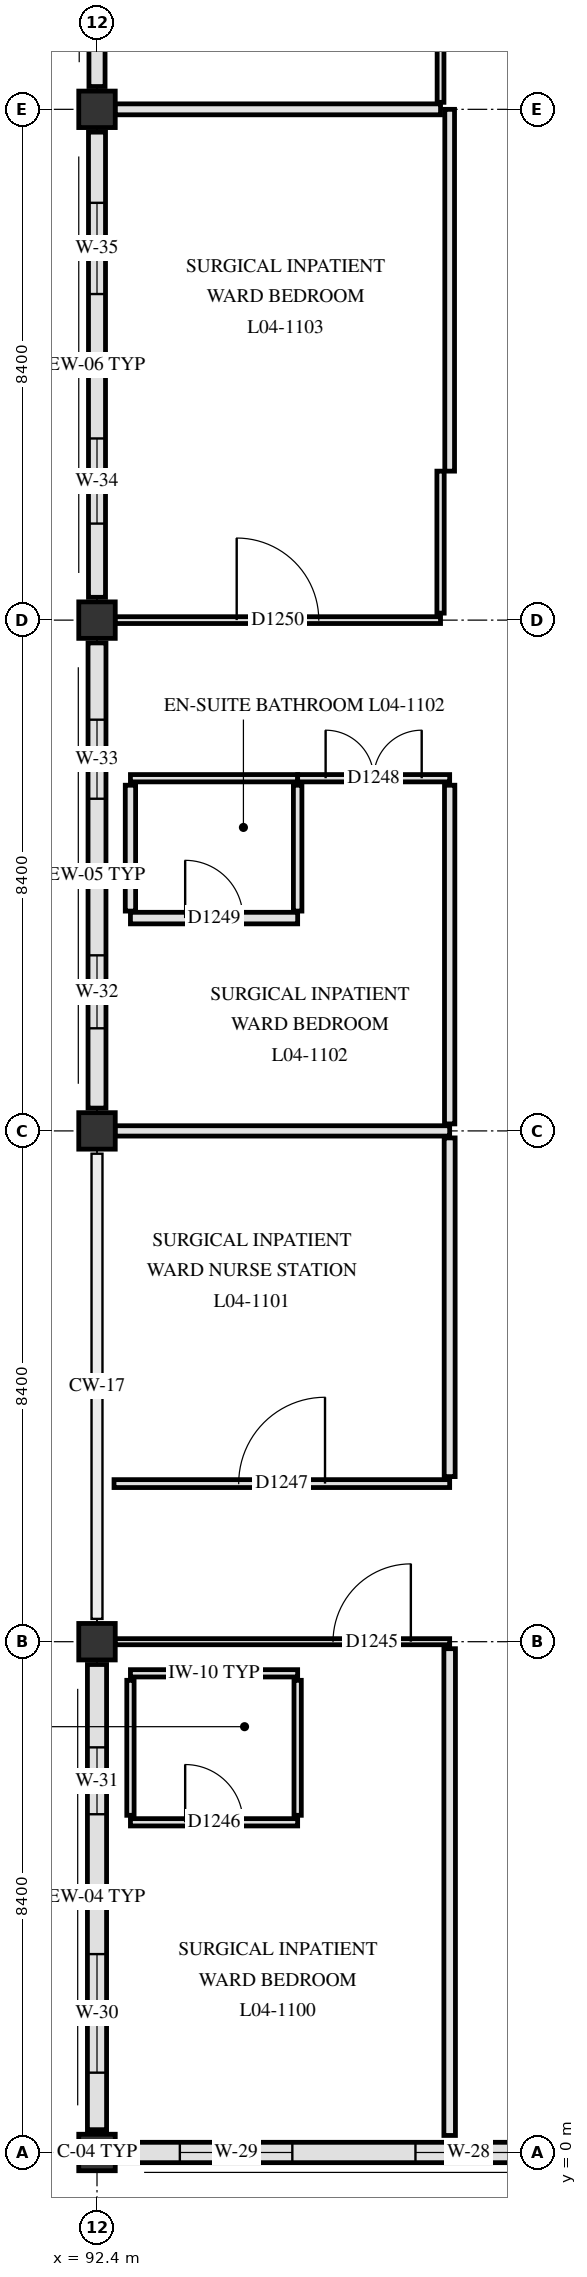
"""IFC4 building model, lengths in metres.
Left out: names, types, materials, properties, quantities, classifications, styles, units other than length and angle.
Written with IfcOpenShell. Run it as: python <this file> out.ifc"""

import sys

from ifc_helpers import new_model, si_unit, direction, frame, frame_2d, origin, origin_2d, place, context, subcontext, project, spatial, rectangle, extrude, element, fill, save


model = new_model("IFC4")
c1 = context("Model", 3, precision=1e-05, world=origin(), true_north=direction((0.0, 1.0)))
c2 = subcontext(c1, "Body", "Model", "MODEL_VIEW")
j1 = project(units=[si_unit("LENGTHUNIT", "METRE"), si_unit("PLANEANGLEUNIT", "RADIAN")], contexts=[c1])
p1 = place(None, origin())
s1 = spatial("IfcSite", under=j1, at=p1, CompositionType="ELEMENT")
p2 = place(p1, origin())
s2 = spatial("IfcBuilding", under=s1, at=p2, CompositionType="ELEMENT")
p3 = place(p2, frame((0.0, 0.0, 18.6)))
s3 = spatial("IfcBuildingStorey", under=s2, at=p3, CompositionType="ELEMENT", Elevation=18.6)
for number, where, z_axis, x_axis in (
    (1, (92.4, 0.0, 0.0), (0.0, 0.0, 1.0), (1.0, 0.0, 0.0)),
    (2, (92.4, 8.4, 0.0), (0.0, 0.0, 1.0), (1.0, 0.0, 0.0)),
    (3, (92.4, 16.8, 0.0), (0.0, 0.0, 1.0), (1.0, 0.0, 0.0)),
    (4, (92.4, 25.2, 0.0), (0.0, 0.0, 1.0), (1.0, 0.0, 0.0)),
    (5, (92.4, 33.6, 0.0), (0.0, 0.0, 1.0), (1.0, 0.0, 0.0)),
):
    element("IfcColumn", number, at=place(p3, frame(where, z_axis=z_axis, x_axis=x_axis)), inside=s3, PredefinedType="COLUMN", context=c2, shape_type="SweptSolid", body=[
        extrude(rectangle(XDim=0.6, YDim=0.6, at=origin_2d()), origin(), (0.0, 0.0, 1.0), 3.9),
    ])
p4 = place(p3, frame((100.425, 0.0, 0.0), z_axis=(0.0, 0.0, 1.0), x_axis=(-1.0, 0.0, 0.0)))
e6 = element("IfcWall", 6, at=p4, inside=s3, PredefinedType="SOLIDWALL", context=c2, shape_type="SweptSolid", body=[
    extrude(rectangle(XDim=7.65, YDim=0.335, at=frame_2d((3.825, 0.0))), origin(), (0.0, 0.0, 1.0), 3.31),
])
p5 = place(p4, frame((1.038, 0.0, 0.85)))
e7 = element("IfcOpeningElement", 7, at=p5, cuts=e6, PredefinedType="OPENING", context=c2, shape_type="SweptSolid", body=[
    extrude(rectangle(XDim=1.75, YDim=1.54, at=frame_2d((0.875, 0.77))), frame((0.0, 0.177, 0.0), z_axis=(0.0, -1.0, 0.0), x_axis=(1.0, 0.0, 0.0)), (0.0, 0.0, 1.0), 0.355),
])
p6 = place(p4, frame((4.812, 0.0, 0.85)))
e8 = element("IfcOpeningElement", 8, at=p6, cuts=e6, PredefinedType="OPENING", context=c2, shape_type="SweptSolid", body=[
    extrude(rectangle(XDim=1.85, YDim=1.54, at=frame_2d((0.925, 0.77))), frame((0.0, 0.177, 0.0), z_axis=(0.0, -1.0, 0.0), x_axis=(1.0, 0.0, 0.0)), (0.0, 0.0, 1.0), 0.355),
])
p7 = place(p3, frame((92.4, 0.375, 0.0), z_axis=(0.0, 0.0, 1.0), x_axis=(0.0, 1.0, 0.0)))
e9 = element("IfcWall", 9, at=p7, inside=s3, PredefinedType="SOLIDWALL", context=c2, shape_type="SweptSolid", body=[
    extrude(rectangle(XDim=7.65, YDim=0.315, at=frame_2d((3.825, 0.0))), origin(), (0.0, 0.0, 1.0), 3.31),
])
p8 = place(p7, frame((0.938, 0.0, 0.85)))
e10 = element("IfcOpeningElement", 10, at=p8, cuts=e9, PredefinedType="OPENING", context=c2, shape_type="SweptSolid", body=[
    extrude(rectangle(XDim=1.95, YDim=1.54, at=frame_2d((0.975, 0.77))), frame((0.0, 0.167, 0.0), z_axis=(0.0, -1.0, 0.0), x_axis=(1.0, 0.0, 0.0)), (0.0, 0.0, 1.0), 0.335),
])
p9 = place(p7, frame((5.188, 0.0, 0.85)))
e11 = element("IfcOpeningElement", 11, at=p9, cuts=e9, PredefinedType="OPENING", context=c2, shape_type="SweptSolid", body=[
    extrude(rectangle(XDim=1.1, YDim=1.66, at=frame_2d((0.55, 0.83))), frame((0.0, 0.167, 0.0), z_axis=(0.0, -1.0, 0.0), x_axis=(1.0, 0.0, 0.0)), (0.0, 0.0, 1.0), 0.335),
])
p10 = place(p3, frame((92.4, 17.175, 0.0), z_axis=(0.0, 0.0, 1.0), x_axis=(0.0, 1.0, 0.0)))
e12 = element("IfcWall", 12, at=p10, inside=s3, PredefinedType="SOLIDWALL", context=c2, shape_type="SweptSolid", body=[
    extrude(rectangle(XDim=7.65, YDim=0.295, at=frame_2d((3.825, 0.0))), origin(), (0.0, 0.0, 1.0), 3.31),
])
p11 = place(p10, frame((1.312, 0.0, 0.85)))
e13 = element("IfcOpeningElement", 13, at=p11, cuts=e12, PredefinedType="OPENING", context=c2, shape_type="SweptSolid", body=[
    extrude(rectangle(XDim=1.2, YDim=1.66, at=frame_2d((0.6, 0.83))), frame((0.0, 0.157, 0.0), z_axis=(0.0, -1.0, 0.0), x_axis=(1.0, 0.0, 0.0)), (0.0, 0.0, 1.0), 0.315),
])
p12 = place(p10, frame((5.087, 0.0, 0.85)))
e14 = element("IfcOpeningElement", 14, at=p12, cuts=e12, PredefinedType="OPENING", context=c2, shape_type="SweptSolid", body=[
    extrude(rectangle(XDim=1.3, YDim=1.66, at=frame_2d((0.65, 0.83))), frame((0.0, 0.157, 0.0), z_axis=(0.0, -1.0, 0.0), x_axis=(1.0, 0.0, 0.0)), (0.0, 0.0, 1.0), 0.315),
])
p13 = place(p3, frame((92.4, 25.575, 0.0), z_axis=(0.0, 0.0, 1.0), x_axis=(0.0, 1.0, 0.0)))
e15 = element("IfcWall", 15, at=p13, inside=s3, PredefinedType="SOLIDWALL", context=c2, shape_type="SweptSolid", body=[
    extrude(rectangle(XDim=7.65, YDim=0.28, at=frame_2d((3.825, 0.0))), origin(), (0.0, 0.0, 1.0), 3.31),
])
p14 = place(p13, frame((1.212, 0.0, 0.85)))
e16 = element("IfcOpeningElement", 16, at=p14, cuts=e15, PredefinedType="OPENING", context=c2, shape_type="SweptSolid", body=[
    extrude(rectangle(XDim=1.4, YDim=1.66, at=frame_2d((0.7, 0.83))), frame((0.0, 0.15, 0.0), z_axis=(0.0, -1.0, 0.0), x_axis=(1.0, 0.0, 0.0)), (0.0, 0.0, 1.0), 0.3),
])
p15 = place(p13, frame((4.988, 0.0, 0.85)))
e17 = element("IfcOpeningElement", 17, at=p15, cuts=e15, PredefinedType="OPENING", context=c2, shape_type="SweptSolid", body=[
    extrude(rectangle(XDim=1.5, YDim=1.66, at=frame_2d((0.75, 0.83))), frame((0.0, 0.15, 0.0), z_axis=(0.0, -1.0, 0.0), x_axis=(1.0, 0.0, 0.0)), (0.0, 0.0, 1.0), 0.3),
])
p16 = place(p3, frame((92.4, 33.975, 0.0), z_axis=(0.0, 0.0, 1.0), x_axis=(0.0, 1.0, 0.0)))
e18 = element("IfcWall", 18, at=p16, inside=s3, PredefinedType="SOLIDWALL", context=c2, shape_type="SweptSolid", body=[
    extrude(rectangle(XDim=7.65, YDim=0.265, at=frame_2d((3.825, 0.0))), origin(), (0.0, 0.0, 1.0), 3.38),
])
p17 = place(p16, frame((1.113, 0.0, 0.85)))
e19 = element("IfcOpeningElement", 19, at=p17, cuts=e18, PredefinedType="OPENING", context=c2, shape_type="SweptSolid", body=[
    extrude(rectangle(XDim=1.6, YDim=1.66, at=frame_2d((0.8, 0.83))), frame((0.0, 0.142, 0.0), z_axis=(0.0, -1.0, 0.0), x_axis=(1.0, 0.0, 0.0)), (0.0, 0.0, 1.0), 0.285),
])
p18 = place(p16, frame((4.887, 0.0, 0.85)))
e20 = element("IfcOpeningElement", 20, at=p18, cuts=e18, PredefinedType="OPENING", context=c2, shape_type="SweptSolid", body=[
    extrude(rectangle(XDim=1.7, YDim=1.66, at=frame_2d((0.85, 0.83))), frame((0.0, 0.142, 0.0), z_axis=(0.0, -1.0, 0.0), x_axis=(1.0, 0.0, 0.0)), (0.0, 0.0, 1.0), 0.285),
])
p19 = place(p3, frame((92.95, 5.43, 0.0), z_axis=(0.0, 0.0, 1.0), x_axis=(1.0, 0.0, 0.0)))
e21 = element("IfcWall", 21, at=p19, inside=s3, PredefinedType="PARTITIONING", context=c2, shape_type="SweptSolid", body=[
    extrude(rectangle(XDim=2.75, YDim=0.12, at=frame_2d((1.375, 0.0))), origin(), (0.0, 0.0, 1.0), 3.61),
])
p20 = place(p19, frame((0.9, 0.0, 0.0)))
e22 = element("IfcOpeningElement", 22, at=p20, cuts=e21, PredefinedType="OPENING", context=c2, shape_type="SweptSolid", body=[
    extrude(rectangle(XDim=0.95, YDim=2.1, at=frame_2d((0.475, 1.05))), frame((0.0, 0.07, 0.0), z_axis=(0.0, -1.0, 0.0), x_axis=(1.0, 0.0, 0.0)), (0.0, 0.0, 1.0), 0.14),
])
p21 = place(p3, frame((92.95, 7.88, 0.0), z_axis=(0.0, 0.0, 1.0), x_axis=(1.0, 0.0, 0.0)))
e23 = element("IfcWall", 23, at=p21, inside=s3, PredefinedType="PARTITIONING", context=c2, shape_type="SweptSolid", body=[
    extrude(rectangle(XDim=2.75, YDim=0.12, at=frame_2d((1.375, 0.0))), origin(), (0.0, 0.0, 1.0), 3.61),
])
p22 = place(p3, frame((92.695, 8.4, 0.0), z_axis=(0.0, 0.0, 1.0), x_axis=(1.0, 0.0, 0.0)))
e24 = element("IfcWall", 24, at=p22, inside=s3, PredefinedType="PARTITIONING", context=c2, shape_type="SweptSolid", body=[
    extrude(rectangle(XDim=5.505, YDim=0.1, at=frame_2d((2.752, 0.0))), origin(), (0.0, 0.0, 1.0), 3.16),
])
p23 = place(p22, frame((3.587, 0.0, 0.0)))
e25 = element("IfcOpeningElement", 25, at=p23, cuts=e24, PredefinedType="OPENING", context=c2, shape_type="SweptSolid", body=[
    extrude(rectangle(XDim=1.28, YDim=2.18, at=frame_2d((0.64, 1.09))), frame((0.0, 0.06, 0.0), z_axis=(0.0, -1.0, 0.0), x_axis=(1.0, 0.0, 0.0)), (0.0, 0.0, 1.0), 0.12),
])
p24 = place(p3, frame((92.68, 11.0, 0.0), z_axis=(0.0, 0.0, 1.0), x_axis=(1.0, 0.0, 0.0)))
e26 = element("IfcWall", 26, at=p24, inside=s3, PredefinedType="PARTITIONING", context=c2, shape_type="SweptSolid", body=[
    extrude(rectangle(XDim=5.52, YDim=0.13, at=frame_2d((2.76, 0.0))), origin(), (0.0, 0.0, 1.0), 3.61),
])
p25 = place(p24, frame((2.05, 0.0, 0.0)))
e27 = element("IfcOpeningElement", 27, at=p25, cuts=e26, PredefinedType="OPENING", context=c2, shape_type="SweptSolid", body=[
    extrude(rectangle(XDim=1.42, YDim=2.22, at=frame_2d((0.71, 1.11))), frame((0.0, 0.075, 0.0), z_axis=(0.0, -1.0, 0.0), x_axis=(1.0, 0.0, 0.0)), (0.0, 0.0, 1.0), 0.15),
])
p26 = place(p3, frame((92.695, 16.8, 0.0), z_axis=(0.0, 0.0, 1.0), x_axis=(1.0, 0.0, 0.0)))
e28 = element("IfcWall", 28, at=p26, inside=s3, PredefinedType="PARTITIONING", context=c2, shape_type="SweptSolid", body=[
    extrude(rectangle(XDim=5.505, YDim=0.17, at=frame_2d((2.752, 0.0))), origin(), (0.0, 0.0, 1.0), 3.16),
])
p27 = place(p3, frame((92.95, 20.3, 0.0), z_axis=(0.0, 0.0, 1.0), x_axis=(1.0, 0.0, 0.0)))
e29 = element("IfcWall", 29, at=p27, inside=s3, PredefinedType="PARTITIONING", context=c2, shape_type="SweptSolid", body=[
    extrude(rectangle(XDim=2.75, YDim=0.19, at=frame_2d((1.375, 0.0))), origin(), (0.0, 0.0, 1.0), 3.61),
])
p28 = place(p27, frame((0.9, 0.0, 0.0)))
e30 = element("IfcOpeningElement", 30, at=p28, cuts=e29, PredefinedType="OPENING", context=c2, shape_type="SweptSolid", body=[
    extrude(rectangle(XDim=0.95, YDim=2.1, at=frame_2d((0.475, 1.05))), frame((0.0, 0.105, 0.0), z_axis=(0.0, -1.0, 0.0), x_axis=(1.0, 0.0, 0.0)), (0.0, 0.0, 1.0), 0.21),
])
p29 = place(p3, frame((92.95, 22.6, 0.0), z_axis=(0.0, 0.0, 1.0), x_axis=(1.0, 0.0, 0.0)))
e31 = element("IfcWall", 31, at=p29, inside=s3, PredefinedType="PARTITIONING", context=c2, shape_type="SweptSolid", body=[
    extrude(rectangle(XDim=2.75, YDim=0.12, at=frame_2d((1.375, 0.0))), origin(), (0.0, 0.0, 1.0), 3.61),
])
p30 = place(p3, frame((95.7, 22.6, 0.0), z_axis=(0.0, 0.0, 1.0), x_axis=(1.0, 0.0, 0.0)))
e32 = element("IfcWall", 32, at=p30, inside=s3, PredefinedType="PARTITIONING", context=c2, shape_type="SweptSolid", body=[
    extrude(rectangle(XDim=2.5, YDim=0.12, at=frame_2d((1.25, 0.0))), origin(), (0.0, 0.0, 1.0), 3.61),
])
p31 = place(p30, frame((0.46, 0.0, 0.0)))
e33 = element("IfcOpeningElement", 33, at=p31, cuts=e32, PredefinedType="OPENING", context=c2, shape_type="SweptSolid", body=[
    extrude(rectangle(XDim=1.58, YDim=2.22, at=frame_2d((0.79, 1.11))), frame((0.0, 0.07, 0.0), z_axis=(0.0, -1.0, 0.0), x_axis=(1.0, 0.0, 0.0)), (0.0, 0.0, 1.0), 0.14),
])
p32 = place(p3, frame((92.695, 25.2, 0.0), z_axis=(0.0, 0.0, 1.0), x_axis=(1.0, 0.0, 0.0)))
e34 = element("IfcWall", 34, at=p32, inside=s3, PredefinedType="PARTITIONING", context=c2, shape_type="SweptSolid", body=[
    extrude(rectangle(XDim=5.355, YDim=0.112, at=frame_2d((2.677, 0.0))), origin(), (0.0, 0.0, 1.0), 3.16),
])
p33 = place(p32, frame((2.002, 0.0, 0.0)))
e35 = element("IfcOpeningElement", 35, at=p33, cuts=e34, PredefinedType="OPENING", context=c2, shape_type="SweptSolid", body=[
    extrude(rectangle(XDim=1.35, YDim=2.2, at=frame_2d((0.675, 1.1))), frame((0.0, 0.066, 0.0), z_axis=(0.0, -1.0, 0.0), x_axis=(1.0, 0.0, 0.0)), (0.0, 0.0, 1.0), 0.132),
])
p34 = place(p3, frame((92.695, 33.6, 0.0), z_axis=(0.0, 0.0, 1.0), x_axis=(1.0, 0.0, 0.0)))
e36 = element("IfcWall", 36, at=p34, inside=s3, PredefinedType="PARTITIONING", context=c2, shape_type="SweptSolid", body=[
    extrude(rectangle(XDim=5.355, YDim=0.18, at=frame_2d((2.677, 0.0))), origin(), (0.0, 0.0, 1.0), 3.16),
])
p35 = place(p3, frame((92.95, 5.545, 0.0), z_axis=(0.0, 0.0, 1.0), x_axis=(0.0, 1.0, 0.0)))
e37 = element("IfcWall", 37, at=p35, inside=s3, PredefinedType="PARTITIONING", context=c2, shape_type="SweptSolid", body=[
    extrude(rectangle(XDim=2.22, YDim=0.12, at=frame_2d((1.11, 0.0))), origin(), (0.0, 0.0, 1.0), 3.31),
])
p36 = place(p3, frame((92.95, 20.415, 0.0), z_axis=(0.0, 0.0, 1.0), x_axis=(0.0, 1.0, 0.0)))
e38 = element("IfcWall", 38, at=p36, inside=s3, PredefinedType="PARTITIONING", context=c2, shape_type="SweptSolid", body=[
    extrude(rectangle(XDim=2.07, YDim=0.17, at=frame_2d((1.035, 0.0))), origin(), (0.0, 0.0, 1.0), 3.31),
])
p37 = place(p3, frame((95.7, 5.545, 0.0), z_axis=(0.0, 0.0, 1.0), x_axis=(0.0, 1.0, 0.0)))
e39 = element("IfcWall", 39, at=p37, inside=s3, PredefinedType="PARTITIONING", context=c2, shape_type="SweptSolid", body=[
    extrude(rectangle(XDim=2.22, YDim=0.12, at=frame_2d((1.11, 0.0))), origin(), (0.0, 0.0, 1.0), 3.31),
])
p38 = place(p3, frame((95.7, 20.415, 0.0), z_axis=(0.0, 0.0, 1.0), x_axis=(0.0, 1.0, 0.0)))
e40 = element("IfcWall", 40, at=p38, inside=s3, PredefinedType="PARTITIONING", context=c2, shape_type="SweptSolid", body=[
    extrude(rectangle(XDim=2.07, YDim=0.14, at=frame_2d((1.035, 0.0))), origin(), (0.0, 0.0, 1.0), 3.31),
])
p39 = place(p3, frame((98.05, 25.315, 0.0), z_axis=(0.0, 0.0, 1.0), x_axis=(0.0, 1.0, 0.0)))
e41 = element("IfcWall", 41, at=p39, inside=s3, PredefinedType="PARTITIONING", context=c2, shape_type="SweptSolid", body=[
    extrude(rectangle(XDim=2.335, YDim=0.12, at=frame_2d((1.167, 0.0))), origin(), (0.0, 0.0, 1.0), 3.61),
])
p40 = place(p3, frame((98.05, 33.715, 0.0), z_axis=(0.0, 0.0, 1.0), x_axis=(0.0, 1.0, 0.0)))
e42 = element("IfcWall", 42, at=p40, inside=s3, PredefinedType="PARTITIONING", context=c2, shape_type="SweptSolid", body=[
    extrude(rectangle(XDim=2.335, YDim=0.112, at=frame_2d((1.167, 0.0))), origin(), (0.0, 0.0, 1.0), 3.61),
])
p41 = place(p3, frame((98.2, 0.28, 0.0), z_axis=(0.0, 0.0, 1.0), x_axis=(0.0, 1.0, 0.0)))
e43 = element("IfcWall", 43, at=p41, inside=s3, PredefinedType="PARTITIONING", context=c2, shape_type="SweptSolid", body=[
    extrude(rectangle(XDim=8.005, YDim=0.19, at=frame_2d((4.002, 0.0))), origin(), (0.0, 0.0, 1.0), 3.31),
])
p42 = place(p3, frame((98.2, 11.115, 0.0), z_axis=(0.0, 0.0, 1.0), x_axis=(0.0, 1.0, 0.0)))
e44 = element("IfcWall", 44, at=p42, inside=s3, PredefinedType="PARTITIONING", context=c2, shape_type="SweptSolid", body=[
    extrude(rectangle(XDim=5.57, YDim=0.18, at=frame_2d((2.785, 0.0))), origin(), (0.0, 0.0, 1.0), 3.31),
])
p43 = place(p3, frame((98.2, 16.915, 0.0), z_axis=(0.0, 0.0, 1.0), x_axis=(0.0, 1.0, 0.0)))
e45 = element("IfcWall", 45, at=p43, inside=s3, PredefinedType="PARTITIONING", context=c2, shape_type="SweptSolid", body=[
    extrude(rectangle(XDim=5.57, YDim=0.17, at=frame_2d((2.785, 0.0))), origin(), (0.0, 0.0, 1.0), 3.31),
])
p44 = place(p3, frame((98.2, 27.65, 0.0), z_axis=(0.0, 0.0, 1.0), x_axis=(0.0, 1.0, 0.0)))
e46 = element("IfcWall", 46, at=p44, inside=s3, PredefinedType="PARTITIONING", context=c2, shape_type="SweptSolid", body=[
    extrude(rectangle(XDim=5.95, YDim=0.16, at=frame_2d((2.975, 0.0))), origin(), (0.0, 0.0, 1.0), 3.16),
])
p45 = place(p5, origin())
e47 = element("IfcWindow", 47, at=p45, inside=s3, PartitioningType="SINGLE_PANEL", PredefinedType="WINDOW", context=c2, shape_type="SweptSolid", body=[
    extrude(rectangle(XDim=1.75, YDim=1.54, at=frame_2d((0.875, 0.77))), frame((0.0, 0.03, 0.0), z_axis=(0.0, -1.0, 0.0), x_axis=(1.0, 0.0, 0.0)), (0.0, 0.0, 1.0), 0.06),
])
fill(e7, e47)
p46 = place(p6, origin())
e48 = element("IfcWindow", 48, at=p46, inside=s3, PartitioningType="SINGLE_PANEL", PredefinedType="WINDOW", context=c2, shape_type="SweptSolid", body=[
    extrude(rectangle(XDim=1.85, YDim=1.54, at=frame_2d((0.925, 0.77))), frame((0.0, 0.03, 0.0), z_axis=(0.0, -1.0, 0.0), x_axis=(1.0, 0.0, 0.0)), (0.0, 0.0, 1.0), 0.06),
])
fill(e8, e48)
p47 = place(p8, origin())
e49 = element("IfcWindow", 49, at=p47, inside=s3, PartitioningType="SINGLE_PANEL", PredefinedType="WINDOW", context=c2, shape_type="SweptSolid", body=[
    extrude(rectangle(XDim=1.95, YDim=1.54, at=frame_2d((0.975, 0.77))), frame((0.0, 0.03, 0.0), z_axis=(0.0, -1.0, 0.0), x_axis=(1.0, 0.0, 0.0)), (0.0, 0.0, 1.0), 0.06),
])
fill(e10, e49)
p48 = place(p9, origin())
e50 = element("IfcWindow", 50, at=p48, inside=s3, PartitioningType="SINGLE_PANEL", PredefinedType="WINDOW", context=c2, shape_type="SweptSolid", body=[
    extrude(rectangle(XDim=1.1, YDim=1.66, at=frame_2d((0.55, 0.83))), frame((0.0, 0.03, 0.0), z_axis=(0.0, -1.0, 0.0), x_axis=(1.0, 0.0, 0.0)), (0.0, 0.0, 1.0), 0.06),
])
fill(e11, e50)
p49 = place(p11, origin())
e51 = element("IfcWindow", 51, at=p49, inside=s3, PartitioningType="SINGLE_PANEL", PredefinedType="WINDOW", context=c2, shape_type="SweptSolid", body=[
    extrude(rectangle(XDim=1.2, YDim=1.66, at=frame_2d((0.6, 0.83))), frame((0.0, 0.03, 0.0), z_axis=(0.0, -1.0, 0.0), x_axis=(1.0, 0.0, 0.0)), (0.0, 0.0, 1.0), 0.06),
])
fill(e13, e51)
p50 = place(p12, origin())
e52 = element("IfcWindow", 52, at=p50, inside=s3, PartitioningType="SINGLE_PANEL", PredefinedType="WINDOW", context=c2, shape_type="SweptSolid", body=[
    extrude(rectangle(XDim=1.3, YDim=1.66, at=frame_2d((0.65, 0.83))), frame((0.0, 0.03, 0.0), z_axis=(0.0, -1.0, 0.0), x_axis=(1.0, 0.0, 0.0)), (0.0, 0.0, 1.0), 0.06),
])
fill(e14, e52)
p51 = place(p14, origin())
e53 = element("IfcWindow", 53, at=p51, inside=s3, PartitioningType="SINGLE_PANEL", PredefinedType="WINDOW", context=c2, shape_type="SweptSolid", body=[
    extrude(rectangle(XDim=1.4, YDim=1.66, at=frame_2d((0.7, 0.83))), frame((0.0, 0.03, 0.0), z_axis=(0.0, -1.0, 0.0), x_axis=(1.0, 0.0, 0.0)), (0.0, 0.0, 1.0), 0.06),
])
fill(e16, e53)
p52 = place(p15, origin())
e54 = element("IfcWindow", 54, at=p52, inside=s3, PartitioningType="SINGLE_PANEL", PredefinedType="WINDOW", context=c2, shape_type="SweptSolid", body=[
    extrude(rectangle(XDim=1.5, YDim=1.66, at=frame_2d((0.75, 0.83))), frame((0.0, 0.03, 0.0), z_axis=(0.0, -1.0, 0.0), x_axis=(1.0, 0.0, 0.0)), (0.0, 0.0, 1.0), 0.06),
])
fill(e17, e54)
p53 = place(p23, origin())
e55 = element("IfcDoor", 55, at=p53, inside=s3, OperationType="SINGLE_SWING_RIGHT", PredefinedType="DOOR", context=c2, shape_type="SweptSolid", body=[
    extrude(rectangle(XDim=1.28, YDim=2.18, at=frame_2d((0.64, 1.09))), frame((0.0, 0.025, 0.0), z_axis=(0.0, -1.0, 0.0), x_axis=(1.0, 0.0, 0.0)), (0.0, 0.0, 1.0), 0.05),
])
fill(e25, e55)
p54 = place(p20, origin())
e56 = element("IfcDoor", 56, at=p54, inside=s3, OperationType="SINGLE_SWING_LEFT", PredefinedType="DOOR", context=c2, shape_type="SweptSolid", body=[
    extrude(rectangle(XDim=0.95, YDim=2.1, at=frame_2d((0.475, 1.05))), frame((0.0, 0.025, 0.0), z_axis=(0.0, -1.0, 0.0), x_axis=(1.0, 0.0, 0.0)), (0.0, 0.0, 1.0), 0.05),
])
fill(e22, e56)
p55 = place(p25, origin())
e57 = element("IfcDoor", 57, at=p55, inside=s3, OperationType="SINGLE_SWING_RIGHT", PredefinedType="DOOR", context=c2, shape_type="SweptSolid", body=[
    extrude(rectangle(XDim=1.42, YDim=2.22, at=frame_2d((0.71, 1.11))), frame((0.0, 0.025, 0.0), z_axis=(0.0, -1.0, 0.0), x_axis=(1.0, 0.0, 0.0)), (0.0, 0.0, 1.0), 0.05),
])
fill(e27, e57)
p56 = place(p31, origin())
e58 = element("IfcDoor", 58, at=p56, inside=s3, OperationType="DOUBLE_SWING_LEFT", PredefinedType="DOOR", context=c2, shape_type="SweptSolid", body=[
    extrude(rectangle(XDim=1.58, YDim=2.22, at=frame_2d((0.79, 1.11))), frame((0.0, 0.025, 0.0), z_axis=(0.0, -1.0, 0.0), x_axis=(1.0, 0.0, 0.0)), (0.0, 0.0, 1.0), 0.05),
])
fill(e33, e58)
p57 = place(p28, origin())
e59 = element("IfcDoor", 59, at=p57, inside=s3, OperationType="SINGLE_SWING_LEFT", PredefinedType="DOOR", context=c2, shape_type="SweptSolid", body=[
    extrude(rectangle(XDim=0.95, YDim=2.1, at=frame_2d((0.475, 1.05))), frame((0.0, 0.025, 0.0), z_axis=(0.0, -1.0, 0.0), x_axis=(1.0, 0.0, 0.0)), (0.0, 0.0, 1.0), 0.05),
])
fill(e30, e59)
p58 = place(p33, origin())
e60 = element("IfcDoor", 60, at=p58, inside=s3, OperationType="SINGLE_SWING_LEFT", PredefinedType="DOOR", context=c2, shape_type="SweptSolid", body=[
    extrude(rectangle(XDim=1.35, YDim=2.2, at=frame_2d((0.675, 1.1))), frame((0.0, 0.025, 0.0), z_axis=(0.0, -1.0, 0.0), x_axis=(1.0, 0.0, 0.0)), (0.0, 0.0, 1.0), 0.05),
])
fill(e35, e60)
save(model, sys.argv[1])
